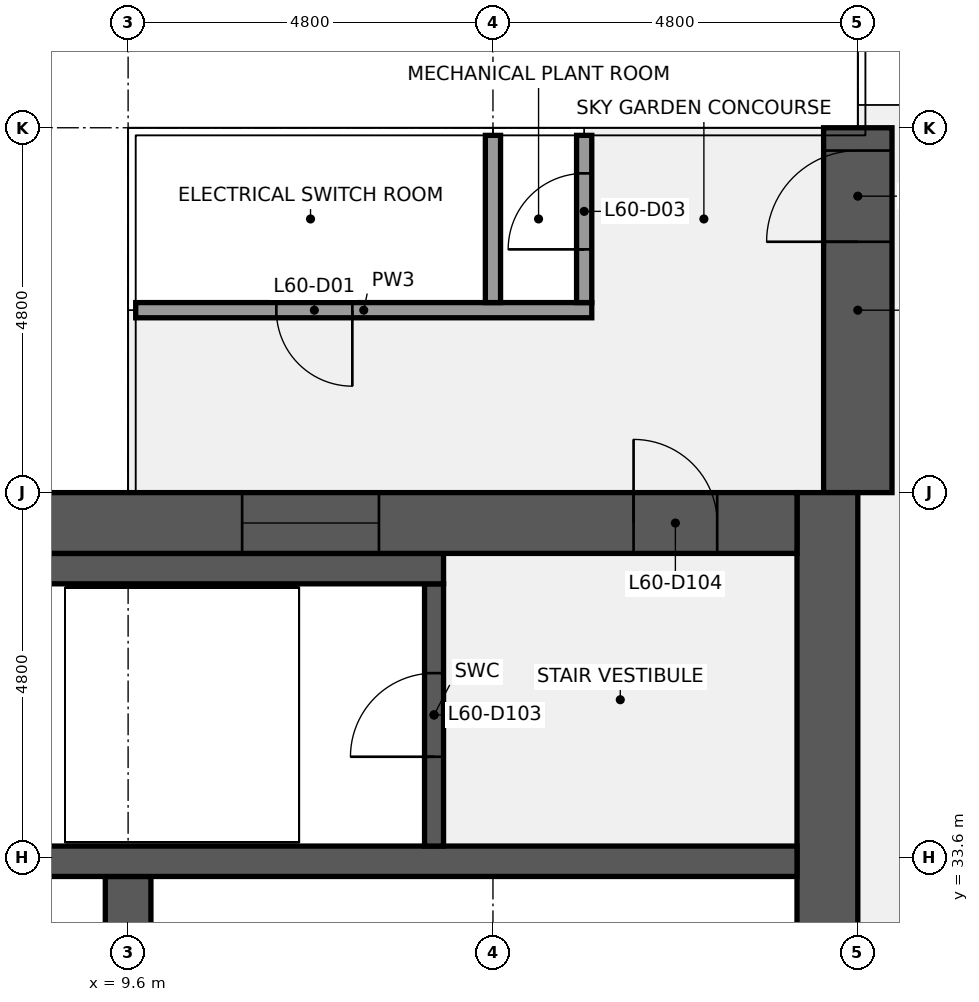
"""IFC4 building model, lengths in metres.
Left out: names, types, materials, properties, quantities, classifications, styles, units other than length and angle.
Written with IfcOpenShell. Run it as: python <this file> out.ifc"""

import sys

from ifc_helpers import new_model, si_unit, direction, frame, frame_2d, origin, place, context, subcontext, project, spatial, rectangle, extrude, element, fill, save


model = new_model("IFC4")
c1 = context("Model", 3, precision=1e-05, world=origin(), true_north=direction((0.0, 1.0)))
c2 = subcontext(c1, "Body", "Model", "MODEL_VIEW")
j1 = project(units=[si_unit("LENGTHUNIT", "METRE"), si_unit("PLANEANGLEUNIT", "RADIAN")], contexts=[c1])
p1 = place(None, origin())
s1 = spatial("IfcSite", under=j1, at=p1, CompositionType="ELEMENT")
p2 = place(p1, origin())
s2 = spatial("IfcBuilding", under=s1, at=p2, CompositionType="ELEMENT")
p3 = place(p2, frame((0.0, 0.0, 269.7)))
s3 = spatial("IfcBuildingStorey", under=s2, at=p3, CompositionType="ELEMENT", Elevation=269.7)
p4 = place(p3, frame((19.2, 38.4, 0.0), z_axis=(0.0, 0.0, 1.0), x_axis=(0.0, 1.0, 0.0)))
e1 = element("IfcWall", 1, at=p4, inside=s3, PredefinedType="SHEAR", context=c2, shape_type="SweptSolid", body=[
    extrude(rectangle(XDim=4.8, YDim=0.9, at=frame_2d((2.4, 0.0))), origin(), (0.0, 0.0, 1.0), 12.3),
])
p5 = place(p4, frame((3.3, 0.0, 0.0)))
e2 = element("IfcOpeningElement", 2, at=p5, cuts=e1, PredefinedType="OPENING", context=c2, shape_type="SweptSolid", body=[
    extrude(rectangle(XDim=1.2, YDim=2.1, at=frame_2d((0.6, 1.05))), frame((0.0, 0.46, 0.0), z_axis=(0.0, -1.0, 0.0), x_axis=(1.0, 0.0, 0.0)), (0.0, 0.0, 1.0), 0.92),
])
p6 = place(p3, frame((18.8, 38.4, 0.0), z_axis=(0.0, 0.0, 1.0), x_axis=(0.0, -1.0, 0.0)))
e3 = element("IfcWall", 3, at=p6, inside=s3, PredefinedType="SHEAR", context=c2, shape_type="SweptSolid", body=[
    extrude(rectangle(XDim=28.8, YDim=0.8, at=frame_2d((14.4, 0.0))), origin(), (0.0, 0.0, 1.0), 12.3),
])
p7 = place(p6, frame((18.3, 0.0, 0.0)))
e4 = element("IfcOpeningElement", 4, at=p7, cuts=e3, PredefinedType="OPENING", context=c2, shape_type="SweptSolid", body=[
    extrude(rectangle(XDim=1.8, YDim=2.1, at=frame_2d((0.9, 1.05))), frame((0.0, 0.41, 0.0), z_axis=(0.0, -1.0, 0.0), x_axis=(1.0, 0.0, 0.0)), (0.0, 0.0, 1.0), 0.82),
])
p8 = place(p6, frame((8.7, 0.0, 0.0)))
e5 = element("IfcOpeningElement", 5, at=p8, cuts=e3, PredefinedType="OPENING", context=c2, shape_type="SweptSolid", body=[
    extrude(rectangle(XDim=1.8, YDim=2.1, at=frame_2d((0.9, 1.05))), frame((0.0, 0.41, 0.0), z_axis=(0.0, -1.0, 0.0), x_axis=(1.0, 0.0, 0.0)), (0.0, 0.0, 1.0), 0.82),
])
p9 = place(p3, frame((9.6, 30.75, 0.0), z_axis=(0.0, 0.0, 1.0), x_axis=(0.0, 1.0, 0.0)))
e6 = element("IfcWall", 6, at=p9, inside=s3, PredefinedType="SHEAR", context=c2, shape_type="SweptSolid", body=[
    extrude(rectangle(XDim=2.6, YDim=0.6, at=frame_2d((1.3, 0.0))), origin(), (0.0, 0.0, 1.0), 12.3),
])
p10 = place(p3, frame((0.8, 33.55, 0.0), z_axis=(0.0, 0.0, 1.0), x_axis=(1.0, 0.0, 0.0)))
e7 = element("IfcWall", 7, at=p10, inside=s3, PredefinedType="SHEAR", context=c2, shape_type="SweptSolid", body=[
    extrude(rectangle(XDim=17.6, YDim=0.4, at=frame_2d((8.8, 0.0))), origin(), (0.0, 0.0, 1.0), 12.3),
])
p11 = place(p3, frame((13.625, 33.75, 0.0), z_axis=(0.0, 0.0, 1.0), x_axis=(0.0, 1.0, 0.0)))
e8 = element("IfcWall", 8, at=p11, inside=s3, PredefinedType="SHEAR", context=c2, shape_type="SweptSolid", body=[
    extrude(rectangle(XDim=3.45, YDim=0.25, at=frame_2d((1.725, 0.0))), origin(), (0.0, 0.0, 1.0), 12.3),
])
p12 = place(p11, frame((1.175, 0.0, 0.0)))
e9 = element("IfcOpeningElement", 9, at=p12, cuts=e8, PredefinedType="OPENING", context=c2, shape_type="SweptSolid", body=[
    extrude(rectangle(XDim=1.1, YDim=2.1, at=frame_2d((0.55, 1.05))), frame((0.0, 0.135, 0.0), z_axis=(0.0, -1.0, 0.0), x_axis=(1.0, 0.0, 0.0)), (0.0, 0.0, 1.0), 0.27),
])
p13 = place(p3, frame((6.25, 37.4, 0.0), z_axis=(0.0, 0.0, 1.0), x_axis=(1.0, 0.0, 0.0)))
e10 = element("IfcWall", 10, at=p13, inside=s3, PredefinedType="SHEAR", context=c2, shape_type="SweptSolid", body=[
    extrude(rectangle(XDim=7.5, YDim=0.4, at=frame_2d((3.75, 0.0))), origin(), (0.0, 0.0, 1.0), 12.3),
])
p14 = place(p3, frame((0.8, 38.0, 0.0), z_axis=(0.0, 0.0, 1.0), x_axis=(1.0, 0.0, 0.0)))
e11 = element("IfcWall", 11, at=p14, inside=s3, PredefinedType="SHEAR", context=c2, shape_type="SweptSolid", body=[
    extrude(rectangle(XDim=17.6, YDim=0.8, at=frame_2d((8.8, 0.0))), origin(), (0.0, 0.0, 1.0), 12.3),
])
p15 = place(p14, frame((15.45, 0.0, 0.0)))
e12 = element("IfcOpeningElement", 12, at=p15, cuts=e11, PredefinedType="OPENING", context=c2, shape_type="SweptSolid", body=[
    extrude(rectangle(XDim=1.1, YDim=2.1, at=frame_2d((0.55, 1.05))), frame((0.0, 0.41, 0.0), z_axis=(0.0, -1.0, 0.0), x_axis=(1.0, 0.0, 0.0)), (0.0, 0.0, 1.0), 0.82),
])
p16 = place(p14, frame((5.5, 0.0, 0.9)))
e13 = element("IfcOpeningElement", 13, at=p16, cuts=e11, PredefinedType="OPENING", context=c2, shape_type="SweptSolid", body=[
    extrude(rectangle(XDim=1.8, YDim=1.5, at=frame_2d((0.9, 0.75))), frame((0.0, 0.41, 0.0), z_axis=(0.0, -1.0, 0.0), x_axis=(1.0, 0.0, 0.0)), (0.0, 0.0, 1.0), 0.82),
])
p17 = place(p14, frame((10.3, 0.0, 0.9)))
e14 = element("IfcOpeningElement", 14, at=p17, cuts=e11, PredefinedType="OPENING", context=c2, shape_type="SweptSolid", body=[
    extrude(rectangle(XDim=1.8, YDim=1.5, at=frame_2d((0.9, 0.75))), frame((0.0, 0.41, 0.0), z_axis=(0.0, -1.0, 0.0), x_axis=(1.0, 0.0, 0.0)), (0.0, 0.0, 1.0), 0.82),
])
p18 = place(p3, frame((9.7, 40.8, 0.0), z_axis=(0.0, 0.0, 1.0), x_axis=(1.0, 0.0, 0.0)))
e15 = element("IfcWall", 15, at=p18, inside=s3, PredefinedType="PARTITIONING", context=c2, shape_type="SweptSolid", body=[
    extrude(rectangle(XDim=6.0, YDim=0.2, at=frame_2d((3.0, 0.0))), origin(), (0.0, 0.0, 1.0), 11.31),
])
p19 = place(p18, frame((1.85, 0.0, 0.0)))
e16 = element("IfcOpeningElement", 16, at=p19, cuts=e15, PredefinedType="OPENING", context=c2, shape_type="SweptSolid", body=[
    extrude(rectangle(XDim=1.0, YDim=2.1, at=frame_2d((0.5, 1.05))), frame((0.0, 0.11, 0.0), z_axis=(0.0, -1.0, 0.0), x_axis=(1.0, 0.0, 0.0)), (0.0, 0.0, 1.0), 0.22),
])
p20 = place(p3, frame((14.4, 40.9, 0.0), z_axis=(0.0, 0.0, 1.0), x_axis=(0.0, 1.0, 0.0)))
e17 = element("IfcWall", 17, at=p20, inside=s3, PredefinedType="PARTITIONING", context=c2, shape_type="SweptSolid", body=[
    extrude(rectangle(XDim=2.2, YDim=0.2, at=frame_2d((1.1, 0.0))), origin(), (0.0, 0.0, 1.0), 11.31),
])
p21 = place(p3, frame((15.6, 40.9, 0.0), z_axis=(0.0, 0.0, 1.0), x_axis=(0.0, 1.0, 0.0)))
e18 = element("IfcWall", 18, at=p21, inside=s3, PredefinedType="PARTITIONING", context=c2, shape_type="SweptSolid", body=[
    extrude(rectangle(XDim=2.2, YDim=0.2, at=frame_2d((1.1, 0.0))), origin(), (0.0, 0.0, 1.0), 11.31),
])
p22 = place(p21, frame((0.7, 0.0, 0.0)))
e19 = element("IfcOpeningElement", 19, at=p22, cuts=e18, PredefinedType="OPENING", context=c2, shape_type="SweptSolid", body=[
    extrude(rectangle(XDim=1.0, YDim=2.1, at=frame_2d((0.5, 1.05))), frame((0.0, 0.11, 0.0), z_axis=(0.0, -1.0, 0.0), x_axis=(1.0, 0.0, 0.0)), (0.0, 0.0, 1.0), 0.22),
])
p23 = place(p12, origin())
e20 = element("IfcDoor", 20, at=p23, inside=s3, OperationType="SINGLE_SWING_LEFT", PredefinedType="DOOR", context=c2, shape_type="SweptSolid", body=[
    extrude(rectangle(XDim=1.1, YDim=2.1, at=frame_2d((0.55, 1.05))), frame((0.0, 0.025, 0.0), z_axis=(0.0, -1.0, 0.0), x_axis=(1.0, 0.0, 0.0)), (0.0, 0.0, 1.0), 0.05),
])
fill(e9, e20)
p24 = place(p15, origin())
e21 = element("IfcDoor", 21, at=p24, inside=s3, OperationType="SINGLE_SWING_LEFT", PredefinedType="DOOR", context=c2, shape_type="SweptSolid", body=[
    extrude(rectangle(XDim=1.1, YDim=2.1, at=frame_2d((0.55, 1.05))), frame((0.0, 0.025, 0.0), z_axis=(0.0, -1.0, 0.0), x_axis=(1.0, 0.0, 0.0)), (0.0, 0.0, 1.0), 0.05),
])
fill(e12, e21)
p25 = place(p17, origin())
e22 = element("IfcWindow", 22, at=p25, inside=s3, PartitioningType="SINGLE_PANEL", PredefinedType="WINDOW", context=c2, shape_type="SweptSolid", body=[
    extrude(rectangle(XDim=1.8, YDim=1.5, at=frame_2d((0.9, 0.75))), frame((0.0, 0.03, 0.0), z_axis=(0.0, -1.0, 0.0), x_axis=(1.0, 0.0, 0.0)), (0.0, 0.0, 1.0), 0.06),
])
fill(e14, e22)
p26 = place(p19, origin())
e23 = element("IfcDoor", 23, at=p26, inside=s3, OperationType="SINGLE_SWING_RIGHT", PredefinedType="DOOR", context=c2, shape_type="SweptSolid", body=[
    extrude(rectangle(XDim=1.0, YDim=2.1, at=frame_2d((0.5, 1.05))), frame((0.0, 0.025, 0.0), z_axis=(0.0, -1.0, 0.0), x_axis=(1.0, 0.0, 0.0)), (0.0, 0.0, 1.0), 0.05),
])
fill(e16, e23)
p27 = place(p22, origin())
e24 = element("IfcDoor", 24, at=p27, inside=s3, OperationType="SINGLE_SWING_LEFT", PredefinedType="DOOR", context=c2, shape_type="SweptSolid", body=[
    extrude(rectangle(XDim=1.0, YDim=2.1, at=frame_2d((0.5, 1.05))), frame((0.0, 0.025, 0.0), z_axis=(0.0, -1.0, 0.0), x_axis=(1.0, 0.0, 0.0)), (0.0, 0.0, 1.0), 0.05),
])
fill(e19, e24)
p28 = place(p5, origin())
e25 = element("IfcDoor", 25, at=p28, inside=s3, OperationType="SINGLE_SWING_LEFT", PredefinedType="DOOR", context=c2, shape_type="SweptSolid", body=[
    extrude(rectangle(XDim=1.2, YDim=2.1, at=frame_2d((0.6, 1.05))), frame((0.0, 0.025, 0.0), z_axis=(0.0, -1.0, 0.0), x_axis=(1.0, 0.0, 0.0)), (0.0, 0.0, 1.0), 0.05),
])
fill(e2, e25)
save(model, sys.argv[1])
